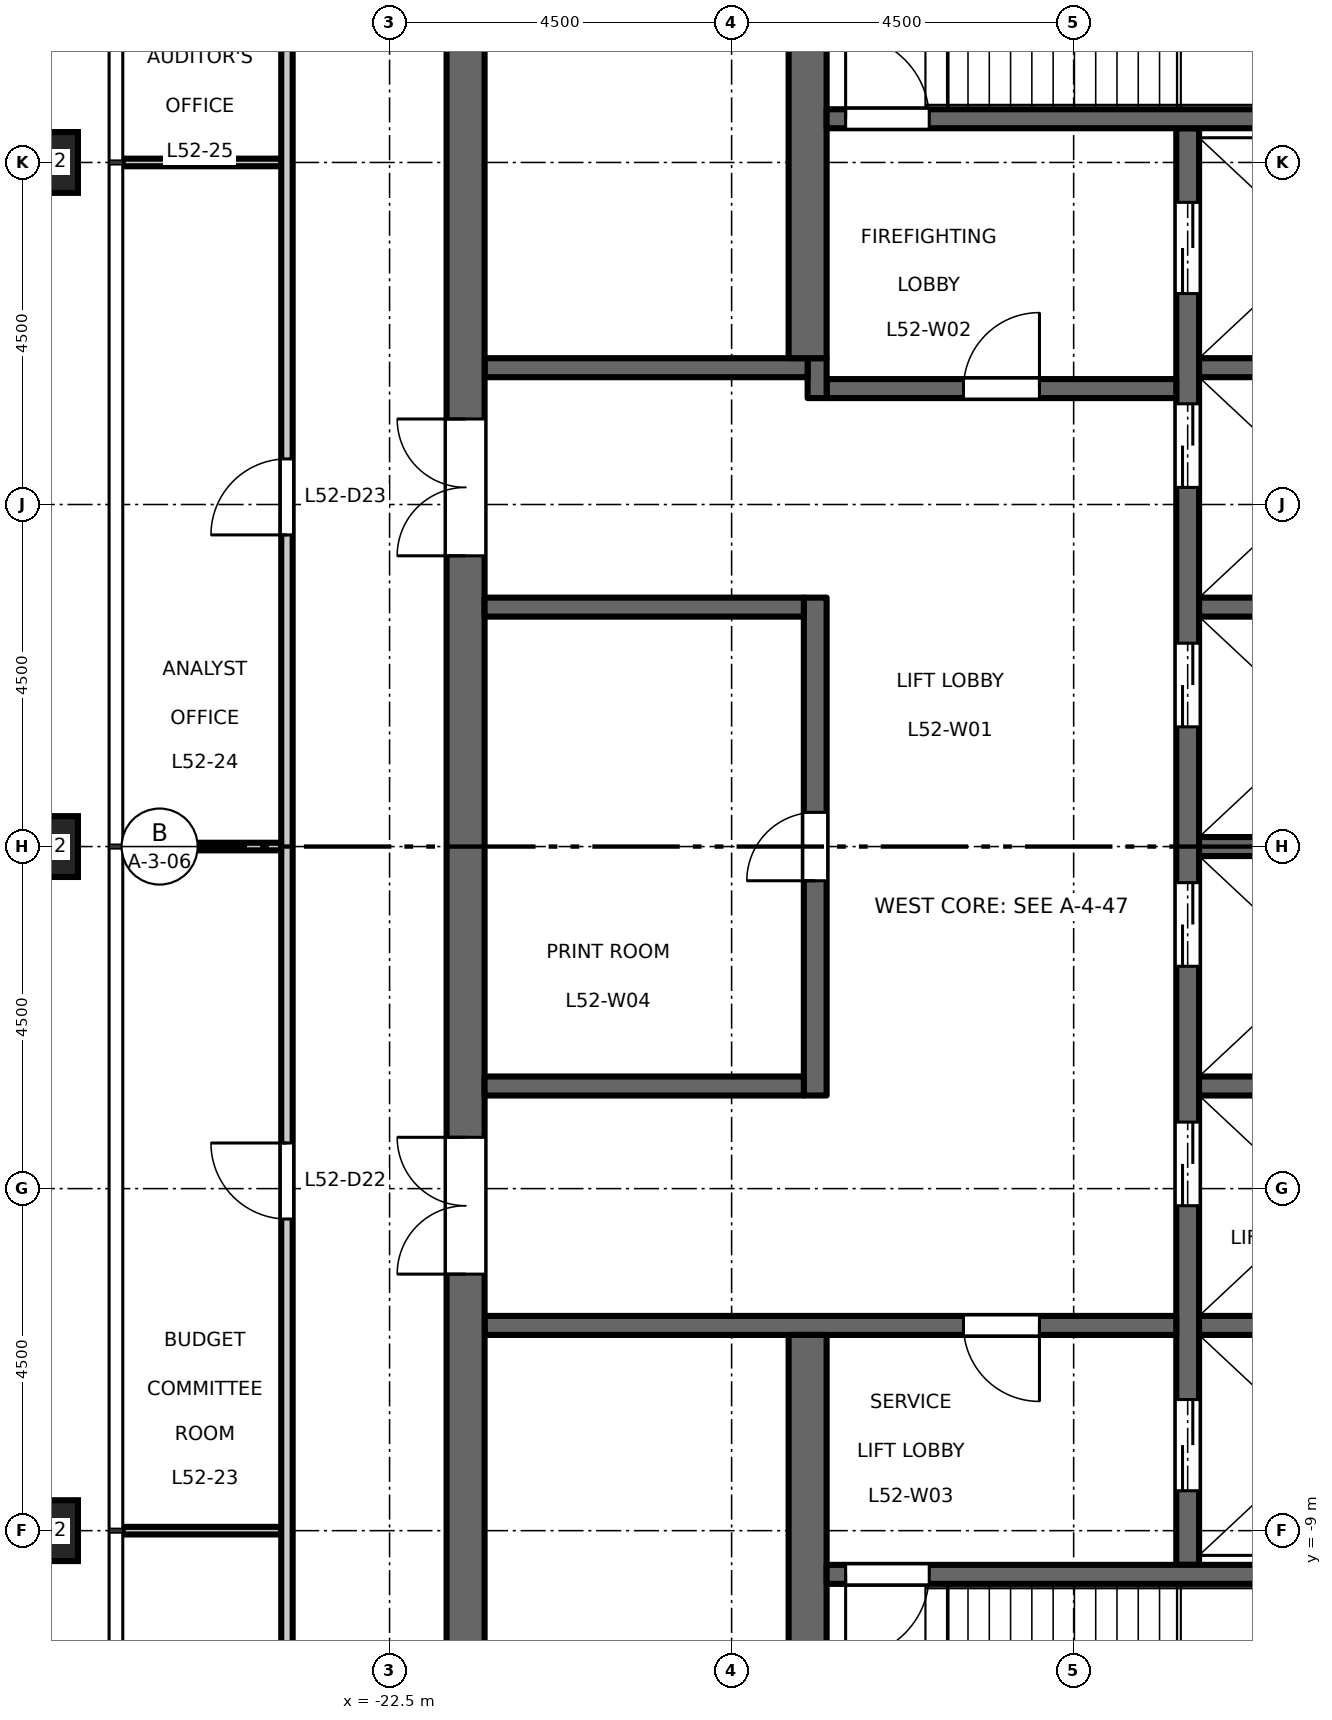
"""IFC4 building model, lengths in metres.
Left out: names, types, materials, properties, quantities, classifications, styles, units other than length and angle.
Written with IfcOpenShell. Run it as: python <this file> out.ifc"""

import sys

from ifc_helpers import new_model, si_unit, direction, frame, frame_2d, origin, origin_2d, place, context, subcontext, project, spatial, rectangle, hollow_rectangle, extrude, element, fill, save


model = new_model("IFC4")
c1 = context("Model", 3, precision=1e-05, world=origin(), true_north=direction((0.0, 1.0)))
c2 = subcontext(c1, "Body", "Model", "MODEL_VIEW")
j1 = project(units=[si_unit("LENGTHUNIT", "METRE"), si_unit("PLANEANGLEUNIT", "RADIAN")], contexts=[c1])
p1 = place(None, origin())
s1 = spatial("IfcSite", under=j1, at=p1, CompositionType="ELEMENT")
p2 = place(p1, origin())
s2 = spatial("IfcBuilding", under=s1, at=p2, CompositionType="ELEMENT")
p3 = place(p2, frame((0.0, 0.0, 242.2)))
s3 = spatial("IfcBuildingStorey", under=s2, at=p3, CompositionType="ELEMENT", Elevation=242.2)
for number, where, z_axis, x_axis in (
    (1, (-27.0, 9.0, 0.0), (0.0, 0.0, 1.0), (1.0, 0.0, 0.0)),
    (2, (-27.0, 0.0, 0.0), (0.0, 0.0, 1.0), (1.0, 0.0, 0.0)),
    (3, (-27.0, -9.0, 0.0), (0.0, 0.0, 1.0), (1.0, 0.0, 0.0)),
):
    element("IfcColumn", number, at=place(p3, frame(where, z_axis=z_axis, x_axis=x_axis)), inside=s3, PredefinedType="COLUMN", context=c2, shape_type="SweptSolid", body=[
        extrude(hollow_rectangle(XDim=0.8, YDim=0.8, WallThickness=0.045, at=origin_2d()), origin(), (0.0, 0.0, 1.0), 4.5),
    ])
p4 = place(p3, frame((-12.0, -9.45, 0.0), z_axis=(0.0, 0.0, 1.0), x_axis=(0.0, 1.0, 0.0)))
e4 = element("IfcWall", 4, at=p4, inside=s3, PredefinedType="SHEAR", context=c2, shape_type="SweptSolid", body=[
    extrude(rectangle(XDim=18.9, YDim=0.3, at=frame_2d((9.45, 0.0))), origin(), (0.0, 0.0, 1.0), 4.35),
])
p5 = place(p4, frame((4.725, 0.0, 0.0)))
e5 = element("IfcOpeningElement", 5, at=p5, cuts=e4, PredefinedType="OPENING", context=c2, shape_type="SweptSolid", body=[
    extrude(rectangle(XDim=1.1, YDim=2.1, at=frame_2d((0.55, 1.05))), frame((0.0, 0.16, 0.0), z_axis=(0.0, -1.0, 0.0), x_axis=(1.0, 0.0, 0.0)), (0.0, 0.0, 1.0), 0.32),
])
p6 = place(p4, frame((7.875, 0.0, 0.0)))
e6 = element("IfcOpeningElement", 6, at=p6, cuts=e4, PredefinedType="OPENING", context=c2, shape_type="SweptSolid", body=[
    extrude(rectangle(XDim=1.1, YDim=2.1, at=frame_2d((0.55, 1.05))), frame((0.0, 0.16, 0.0), z_axis=(0.0, -1.0, 0.0), x_axis=(1.0, 0.0, 0.0)), (0.0, 0.0, 1.0), 0.32),
])
p7 = place(p4, frame((11.025, 0.0, 0.0)))
e7 = element("IfcOpeningElement", 7, at=p7, cuts=e4, PredefinedType="OPENING", context=c2, shape_type="SweptSolid", body=[
    extrude(rectangle(XDim=1.1, YDim=2.1, at=frame_2d((0.55, 1.05))), frame((0.0, 0.16, 0.0), z_axis=(0.0, -1.0, 0.0), x_axis=(1.0, 0.0, 0.0)), (0.0, 0.0, 1.0), 0.32),
])
p8 = place(p4, frame((14.175, 0.0, 0.0)))
e8 = element("IfcOpeningElement", 8, at=p8, cuts=e4, PredefinedType="OPENING", context=c2, shape_type="SweptSolid", body=[
    extrude(rectangle(XDim=1.1, YDim=2.1, at=frame_2d((0.55, 1.05))), frame((0.0, 0.16, 0.0), z_axis=(0.0, -1.0, 0.0), x_axis=(1.0, 0.0, 0.0)), (0.0, 0.0, 1.0), 0.32),
])
p9 = place(p4, frame((16.725, 0.0, 0.0)))
e9 = element("IfcOpeningElement", 9, at=p9, cuts=e4, PredefinedType="OPENING", context=c2, shape_type="SweptSolid", body=[
    extrude(rectangle(XDim=1.2, YDim=2.1, at=frame_2d((0.6, 1.05))), frame((0.0, 0.16, 0.0), z_axis=(0.0, -1.0, 0.0), x_axis=(1.0, 0.0, 0.0)), (0.0, 0.0, 1.0), 0.32),
])
p10 = place(p4, frame((0.975, 0.0, 0.0)))
e10 = element("IfcOpeningElement", 10, at=p10, cuts=e4, PredefinedType="OPENING", context=c2, shape_type="SweptSolid", body=[
    extrude(rectangle(XDim=1.2, YDim=2.1, at=frame_2d((0.6, 1.05))), frame((0.0, 0.16, 0.0), z_axis=(0.0, -1.0, 0.0), x_axis=(1.0, 0.0, 0.0)), (0.0, 0.0, 1.0), 0.32),
])
p11 = place(p3, frame((-12.15, 6.025, 0.0), z_axis=(0.0, 0.0, 1.0), x_axis=(-1.0, 0.0, 0.0)))
e11 = element("IfcWall", 11, at=p11, inside=s3, PredefinedType="SHEAR", context=c2, shape_type="SweptSolid", body=[
    extrude(rectangle(XDim=4.6, YDim=0.25, at=frame_2d((2.3, 0.0))), origin(), (0.0, 0.0, 1.0), 4.35),
])
p12 = place(p11, frame((1.8, 0.0, 0.0)))
e12 = element("IfcOpeningElement", 12, at=p12, cuts=e11, PredefinedType="OPENING", context=c2, shape_type="SweptSolid", body=[
    extrude(rectangle(XDim=1.0, YDim=2.1, at=frame_2d((0.5, 1.05))), frame((0.0, 0.135, 0.0), z_axis=(0.0, -1.0, 0.0), x_axis=(1.0, 0.0, 0.0)), (0.0, 0.0, 1.0), 0.27),
])
p13 = place(p3, frame((-16.875, 5.9, 0.0), z_axis=(0.0, 0.0, 1.0), x_axis=(0.0, 1.0, 0.0)))
e13 = element("IfcWall", 13, at=p13, inside=s3, PredefinedType="SHEAR", context=c2, shape_type="SweptSolid", body=[
    extrude(rectangle(XDim=0.525, YDim=0.25, at=frame_2d((0.263, 0.0))), origin(), (0.0, 0.0, 1.0), 4.35),
])
p14 = place(p3, frame((-17.0, 6.3, 0.0), z_axis=(0.0, 0.0, 1.0), x_axis=(-1.0, 0.0, 0.0)))
e14 = element("IfcWall", 14, at=p14, inside=s3, PredefinedType="SHEAR", context=c2, shape_type="SweptSolid", body=[
    extrude(rectangle(XDim=4.25, YDim=0.25, at=frame_2d((2.125, 0.0))), origin(), (0.0, 0.0, 1.0), 4.35),
])
p15 = place(p3, frame((-12.15, -6.3, 0.0), z_axis=(0.0, 0.0, 1.0), x_axis=(-1.0, 0.0, 0.0)))
e15 = element("IfcWall", 15, at=p15, inside=s3, PredefinedType="SHEAR", context=c2, shape_type="SweptSolid", body=[
    extrude(rectangle(XDim=9.1, YDim=0.25, at=frame_2d((4.55, 0.0))), origin(), (0.0, 0.0, 1.0), 4.35),
])
p16 = place(p15, frame((1.8, 0.0, 0.0)))
e16 = element("IfcOpeningElement", 16, at=p16, cuts=e15, PredefinedType="OPENING", context=c2, shape_type="SweptSolid", body=[
    extrude(rectangle(XDim=1.0, YDim=2.1, at=frame_2d((0.5, 1.05))), frame((0.0, 0.135, 0.0), z_axis=(0.0, -1.0, 0.0), x_axis=(1.0, 0.0, 0.0)), (0.0, 0.0, 1.0), 0.27),
])
p17 = place(p3, frame((-21.5, -13.0, 0.0), z_axis=(0.0, 0.0, 1.0), x_axis=(0.0, 1.0, 0.0)))
e17 = element("IfcWall", 17, at=p17, inside=s3, PredefinedType="SHEAR", context=c2, shape_type="SweptSolid", body=[
    extrude(rectangle(XDim=26.0, YDim=0.5, at=frame_2d((13.0, 0.0))), origin(), (0.0, 0.0, 1.0), 4.35),
])
p18 = place(p17, frame((16.825, 0.0, 0.0)))
e18 = element("IfcOpeningElement", 18, at=p18, cuts=e17, PredefinedType="OPENING", context=c2, shape_type="SweptSolid", body=[
    extrude(rectangle(XDim=1.8, YDim=2.1, at=frame_2d((0.9, 1.05))), frame((0.0, 0.26, 0.0), z_axis=(0.0, -1.0, 0.0), x_axis=(1.0, 0.0, 0.0)), (0.0, 0.0, 1.0), 0.52),
])
p19 = place(p17, frame((7.375, 0.0, 0.0)))
e19 = element("IfcOpeningElement", 19, at=p19, cuts=e17, PredefinedType="OPENING", context=c2, shape_type="SweptSolid", body=[
    extrude(rectangle(XDim=1.8, YDim=2.1, at=frame_2d((0.9, 1.05))), frame((0.0, 0.26, 0.0), z_axis=(0.0, -1.0, 0.0), x_axis=(1.0, 0.0, 0.0)), (0.0, 0.0, 1.0), 0.52),
])
p20 = place(p3, frame((-16.9, -3.275, 0.0), z_axis=(0.0, 0.0, 1.0), x_axis=(0.0, 1.0, 0.0)))
e20 = element("IfcWall", 20, at=p20, inside=s3, PredefinedType="SHEAR", context=c2, shape_type="SweptSolid", body=[
    extrude(rectangle(XDim=6.55, YDim=0.3, at=frame_2d((3.275, 0.0))), origin(), (0.0, 0.0, 1.0), 4.35),
])
p21 = place(p20, frame((2.825, 0.0, 0.0)))
e21 = element("IfcOpeningElement", 21, at=p21, cuts=e20, PredefinedType="OPENING", context=c2, shape_type="SweptSolid", body=[
    extrude(rectangle(XDim=0.9, YDim=2.1, at=frame_2d((0.45, 1.05))), frame((0.0, 0.16, 0.0), z_axis=(0.0, -1.0, 0.0), x_axis=(1.0, 0.0, 0.0)), (0.0, 0.0, 1.0), 0.32),
])
for number, where, z_axis, x_axis in (
    (22, (-17.05, 3.15, 0.0), (0.0, 0.0, 1.0), (-1.0, 0.0, 0.0)),
    (23, (-17.05, -3.15, 0.0), (0.0, 0.0, 1.0), (-1.0, 0.0, 0.0)),
):
    element("IfcWall", number, at=place(p3, frame(where, z_axis=z_axis, x_axis=x_axis)), inside=s3, PredefinedType="SHEAR", context=c2, shape_type="SweptSolid", body=[
        extrude(rectangle(XDim=4.2, YDim=0.25, at=frame_2d((2.1, 0.0))), origin(), (0.0, 0.0, 1.0), 4.35),
    ])
for number, where, z_axis, x_axis in (
    (24, (-17.0, 6.425, 0.0), (0.0, 0.0, 1.0), (0.0, 1.0, 0.0)),
    (25, (-17.0, -13.0, 0.0), (0.0, 0.0, 1.0), (0.0, 1.0, 0.0)),
):
    element("IfcWall", number, at=place(p3, frame(where, z_axis=z_axis, x_axis=x_axis)), inside=s3, PredefinedType="SHEAR", context=c2, shape_type="SweptSolid", body=[
        extrude(rectangle(XDim=6.575, YDim=0.5, at=frame_2d((3.288, 0.0))), origin(), (0.0, 0.0, 1.0), 4.35),
    ])
for number, where, z_axis, x_axis in (
    (26, (-8.75, 0.0, 0.0), (0.0, 0.0, 1.0), (-1.0, 0.0, 0.0)),
    (27, (-8.75, 3.15, 0.0), (0.0, 0.0, 1.0), (-1.0, 0.0, 0.0)),
    (28, (-8.75, 6.3, 0.0), (0.0, 0.0, 1.0), (-1.0, 0.0, 0.0)),
    (29, (-8.75, -3.15, 0.0), (0.0, 0.0, 1.0), (-1.0, 0.0, 0.0)),
    (30, (-8.75, -6.3, 0.0), (0.0, 0.0, 1.0), (-1.0, 0.0, 0.0)),
):
    element("IfcWall", number, at=place(p3, frame(where, z_axis=z_axis, x_axis=x_axis)), inside=s3, PredefinedType="SHEAR", context=c2, shape_type="SweptSolid", body=[
        extrude(rectangle(XDim=3.1, YDim=0.25, at=frame_2d((1.55, 0.0))), origin(), (0.0, 0.0, 1.0), 4.35),
    ])
p22 = place(p3, frame((-8.75, 9.575, 0.0), z_axis=(0.0, 0.0, 1.0), x_axis=(-1.0, 0.0, 0.0)))
e31 = element("IfcWall", 31, at=p22, inside=s3, PredefinedType="SHEAR", context=c2, shape_type="SweptSolid", body=[
    extrude(rectangle(XDim=8.0, YDim=0.25, at=frame_2d((4.0, 0.0))), origin(), (0.0, 0.0, 1.0), 4.35),
])
p23 = place(p22, frame((6.65, 0.0, 0.0)))
e32 = element("IfcOpeningElement", 32, at=p23, cuts=e31, PredefinedType="OPENING", context=c2, shape_type="SweptSolid", body=[
    extrude(rectangle(XDim=1.1, YDim=2.1, at=frame_2d((0.55, 1.05))), frame((0.0, 0.135, 0.0), z_axis=(0.0, -1.0, 0.0), x_axis=(1.0, 0.0, 0.0)), (0.0, 0.0, 1.0), 0.27),
])
p24 = place(p3, frame((-8.75, -9.575, 0.0), z_axis=(0.0, 0.0, 1.0), x_axis=(-1.0, 0.0, 0.0)))
e33 = element("IfcWall", 33, at=p24, inside=s3, PredefinedType="SHEAR", context=c2, shape_type="SweptSolid", body=[
    extrude(rectangle(XDim=8.0, YDim=0.25, at=frame_2d((4.0, 0.0))), origin(), (0.0, 0.0, 1.0), 4.35),
])
p25 = place(p24, frame((6.65, 0.0, 0.0)))
e34 = element("IfcOpeningElement", 34, at=p25, cuts=e33, PredefinedType="OPENING", context=c2, shape_type="SweptSolid", body=[
    extrude(rectangle(XDim=1.1, YDim=2.1, at=frame_2d((0.55, 1.05))), frame((0.0, 0.135, 0.0), z_axis=(0.0, -1.0, 0.0), x_axis=(1.0, 0.0, 0.0)), (0.0, 0.0, 1.0), 0.27),
])
for number, where, z_axis, x_axis in (
    (35, (-26.01, -9.0, 0.0), (0.0, 0.0, 1.0), (1.0, 0.0, 0.0)),
    (36, (-26.01, 0.0, 0.0), (0.0, 0.0, 1.0), (1.0, 0.0, 0.0)),
    (37, (-26.01, 9.0, 0.0), (0.0, 0.0, 1.0), (1.0, 0.0, 0.0)),
):
    element("IfcWall", number, at=place(p3, frame(where, z_axis=z_axis, x_axis=x_axis)), inside=s3, PredefinedType="PARTITIONING", context=c2, shape_type="SweptSolid", body=[
        extrude(rectangle(XDim=2.085, YDim=0.1, at=frame_2d((1.042, 0.0))), origin(), (0.0, 0.0, 1.0), 4.35),
    ])
p26 = place(p3, frame((-23.85, -15.525, 0.0), z_axis=(0.0, 0.0, 1.0), x_axis=(0.0, 1.0, 0.0)))
e38 = element("IfcWall", 38, at=p26, inside=s3, PredefinedType="PARTITIONING", context=c2, shape_type="SweptSolid", body=[
    extrude(rectangle(XDim=31.05, YDim=0.15, at=frame_2d((15.525, 0.0))), origin(), (0.0, 0.0, 1.0), 4.35),
])
p27 = place(p26, frame((3.875, 0.0, 0.0)))
e39 = element("IfcOpeningElement", 39, at=p27, cuts=e38, PredefinedType="OPENING", context=c2, shape_type="SweptSolid", body=[
    extrude(rectangle(XDim=1.0, YDim=2.1, at=frame_2d((0.5, 1.05))), frame((0.0, 0.085, 0.0), z_axis=(0.0, -1.0, 0.0), x_axis=(1.0, 0.0, 0.0)), (0.0, 0.0, 1.0), 0.17),
])
p28 = place(p26, frame((10.625, 0.0, 0.0)))
e40 = element("IfcOpeningElement", 40, at=p28, cuts=e38, PredefinedType="OPENING", context=c2, shape_type="SweptSolid", body=[
    extrude(rectangle(XDim=1.0, YDim=2.1, at=frame_2d((0.5, 1.05))), frame((0.0, 0.085, 0.0), z_axis=(0.0, -1.0, 0.0), x_axis=(1.0, 0.0, 0.0)), (0.0, 0.0, 1.0), 0.17),
])
p29 = place(p26, frame((19.625, 0.0, 0.0)))
e41 = element("IfcOpeningElement", 41, at=p29, cuts=e38, PredefinedType="OPENING", context=c2, shape_type="SweptSolid", body=[
    extrude(rectangle(XDim=1.0, YDim=2.1, at=frame_2d((0.5, 1.05))), frame((0.0, 0.085, 0.0), z_axis=(0.0, -1.0, 0.0), x_axis=(1.0, 0.0, 0.0)), (0.0, 0.0, 1.0), 0.17),
])
p30 = place(p26, frame((26.375, 0.0, 0.0)))
e42 = element("IfcOpeningElement", 42, at=p30, cuts=e38, PredefinedType="OPENING", context=c2, shape_type="SweptSolid", body=[
    extrude(rectangle(XDim=1.0, YDim=2.1, at=frame_2d((0.5, 1.05))), frame((0.0, 0.085, 0.0), z_axis=(0.0, -1.0, 0.0), x_axis=(1.0, 0.0, 0.0)), (0.0, 0.0, 1.0), 0.17),
])
p31 = place(p12, origin())
e43 = element("IfcDoor", 43, at=p31, inside=s3, OperationType="SINGLE_SWING_LEFT", PredefinedType="DOOR", context=c2, shape_type="SweptSolid", body=[
    extrude(rectangle(XDim=1.0, YDim=2.1, at=frame_2d((0.5, 1.05))), frame((0.0, 0.025, 0.0), z_axis=(0.0, -1.0, 0.0), x_axis=(1.0, 0.0, 0.0)), (0.0, 0.0, 1.0), 0.05),
])
fill(e12, e43)
p32 = place(p16, origin())
e44 = element("IfcDoor", 44, at=p32, inside=s3, OperationType="SINGLE_SWING_RIGHT", PredefinedType="DOOR", context=c2, shape_type="SweptSolid", body=[
    extrude(rectangle(XDim=1.0, YDim=2.1, at=frame_2d((0.5, 1.05))), frame((0.0, 0.025, 0.0), z_axis=(0.0, -1.0, 0.0), x_axis=(1.0, 0.0, 0.0)), (0.0, 0.0, 1.0), 0.05),
])
fill(e16, e44)
p33 = place(p23, origin())
e45 = element("IfcDoor", 45, at=p33, inside=s3, OperationType="SINGLE_SWING_RIGHT", PredefinedType="DOOR", context=c2, shape_type="SweptSolid", body=[
    extrude(rectangle(XDim=1.1, YDim=2.1, at=frame_2d((0.55, 1.05))), frame((0.0, 0.025, 0.0), z_axis=(0.0, -1.0, 0.0), x_axis=(1.0, 0.0, 0.0)), (0.0, 0.0, 1.0), 0.05),
])
fill(e32, e45)
p34 = place(p25, origin())
e46 = element("IfcDoor", 46, at=p34, inside=s3, OperationType="SINGLE_SWING_LEFT", PredefinedType="DOOR", context=c2, shape_type="SweptSolid", body=[
    extrude(rectangle(XDim=1.1, YDim=2.1, at=frame_2d((0.55, 1.05))), frame((0.0, 0.025, 0.0), z_axis=(0.0, -1.0, 0.0), x_axis=(1.0, 0.0, 0.0)), (0.0, 0.0, 1.0), 0.05),
])
fill(e34, e46)
p35 = place(p18, origin())
e47 = element("IfcDoor", 47, at=p35, inside=s3, OperationType="DOUBLE_DOOR_DOUBLE_SWING", PredefinedType="DOOR", context=c2, shape_type="SweptSolid", body=[
    extrude(rectangle(XDim=1.8, YDim=2.1, at=frame_2d((0.9, 1.05))), frame((0.0, 0.025, 0.0), z_axis=(0.0, -1.0, 0.0), x_axis=(1.0, 0.0, 0.0)), (0.0, 0.0, 1.0), 0.05),
])
fill(e18, e47)
p36 = place(p19, origin())
e48 = element("IfcDoor", 48, at=p36, inside=s3, OperationType="DOUBLE_DOOR_DOUBLE_SWING", PredefinedType="DOOR", context=c2, shape_type="SweptSolid", body=[
    extrude(rectangle(XDim=1.8, YDim=2.1, at=frame_2d((0.9, 1.05))), frame((0.0, 0.025, 0.0), z_axis=(0.0, -1.0, 0.0), x_axis=(1.0, 0.0, 0.0)), (0.0, 0.0, 1.0), 0.05),
])
fill(e19, e48)
p37 = place(p5, origin())
e49 = element("IfcDoor", 49, at=p37, inside=s3, OperationType="DOUBLE_DOOR_SLIDING", PredefinedType="DOOR", context=c2, shape_type="SweptSolid", body=[
    extrude(rectangle(XDim=1.1, YDim=2.1, at=frame_2d((0.55, 1.05))), frame((0.0, 0.025, 0.0), z_axis=(0.0, -1.0, 0.0), x_axis=(1.0, 0.0, 0.0)), (0.0, 0.0, 1.0), 0.05),
])
fill(e5, e49)
p38 = place(p6, origin())
e50 = element("IfcDoor", 50, at=p38, inside=s3, OperationType="DOUBLE_DOOR_SLIDING", PredefinedType="DOOR", context=c2, shape_type="SweptSolid", body=[
    extrude(rectangle(XDim=1.1, YDim=2.1, at=frame_2d((0.55, 1.05))), frame((0.0, 0.025, 0.0), z_axis=(0.0, -1.0, 0.0), x_axis=(1.0, 0.0, 0.0)), (0.0, 0.0, 1.0), 0.05),
])
fill(e6, e50)
p39 = place(p7, origin())
e51 = element("IfcDoor", 51, at=p39, inside=s3, OperationType="DOUBLE_DOOR_SLIDING", PredefinedType="DOOR", context=c2, shape_type="SweptSolid", body=[
    extrude(rectangle(XDim=1.1, YDim=2.1, at=frame_2d((0.55, 1.05))), frame((0.0, 0.025, 0.0), z_axis=(0.0, -1.0, 0.0), x_axis=(1.0, 0.0, 0.0)), (0.0, 0.0, 1.0), 0.05),
])
fill(e7, e51)
p40 = place(p8, origin())
e52 = element("IfcDoor", 52, at=p40, inside=s3, OperationType="DOUBLE_DOOR_SLIDING", PredefinedType="DOOR", context=c2, shape_type="SweptSolid", body=[
    extrude(rectangle(XDim=1.1, YDim=2.1, at=frame_2d((0.55, 1.05))), frame((0.0, 0.025, 0.0), z_axis=(0.0, -1.0, 0.0), x_axis=(1.0, 0.0, 0.0)), (0.0, 0.0, 1.0), 0.05),
])
fill(e8, e52)
p41 = place(p9, origin())
e53 = element("IfcDoor", 53, at=p41, inside=s3, OperationType="DOUBLE_DOOR_SLIDING", PredefinedType="DOOR", context=c2, shape_type="SweptSolid", body=[
    extrude(rectangle(XDim=1.2, YDim=2.1, at=frame_2d((0.6, 1.05))), frame((0.0, 0.025, 0.0), z_axis=(0.0, -1.0, 0.0), x_axis=(1.0, 0.0, 0.0)), (0.0, 0.0, 1.0), 0.05),
])
fill(e9, e53)
p42 = place(p10, origin())
e54 = element("IfcDoor", 54, at=p42, inside=s3, OperationType="DOUBLE_DOOR_SLIDING", PredefinedType="DOOR", context=c2, shape_type="SweptSolid", body=[
    extrude(rectangle(XDim=1.2, YDim=2.1, at=frame_2d((0.6, 1.05))), frame((0.0, 0.025, 0.0), z_axis=(0.0, -1.0, 0.0), x_axis=(1.0, 0.0, 0.0)), (0.0, 0.0, 1.0), 0.05),
])
fill(e10, e54)
p43 = place(p21, origin())
e55 = element("IfcDoor", 55, at=p43, inside=s3, OperationType="SINGLE_SWING_RIGHT", PredefinedType="DOOR", context=c2, shape_type="SweptSolid", body=[
    extrude(rectangle(XDim=0.9, YDim=2.1, at=frame_2d((0.45, 1.05))), frame((0.0, 0.025, 0.0), z_axis=(0.0, -1.0, 0.0), x_axis=(1.0, 0.0, 0.0)), (0.0, 0.0, 1.0), 0.05),
])
fill(e21, e55)
p44 = place(p28, origin())
e56 = element("IfcDoor", 56, at=p44, inside=s3, OperationType="SINGLE_SWING_RIGHT", PredefinedType="DOOR", context=c2, shape_type="SweptSolid", body=[
    extrude(rectangle(XDim=1.0, YDim=2.1, at=frame_2d((0.5, 1.05))), frame((0.0, 0.025, 0.0), z_axis=(0.0, -1.0, 0.0), x_axis=(1.0, 0.0, 0.0)), (0.0, 0.0, 1.0), 0.05),
])
fill(e40, e56)
p45 = place(p29, origin())
e57 = element("IfcDoor", 57, at=p45, inside=s3, OperationType="SINGLE_SWING_LEFT", PredefinedType="DOOR", context=c2, shape_type="SweptSolid", body=[
    extrude(rectangle(XDim=1.0, YDim=2.1, at=frame_2d((0.5, 1.05))), frame((0.0, 0.025, 0.0), z_axis=(0.0, -1.0, 0.0), x_axis=(1.0, 0.0, 0.0)), (0.0, 0.0, 1.0), 0.05),
])
fill(e41, e57)
save(model, sys.argv[1])
